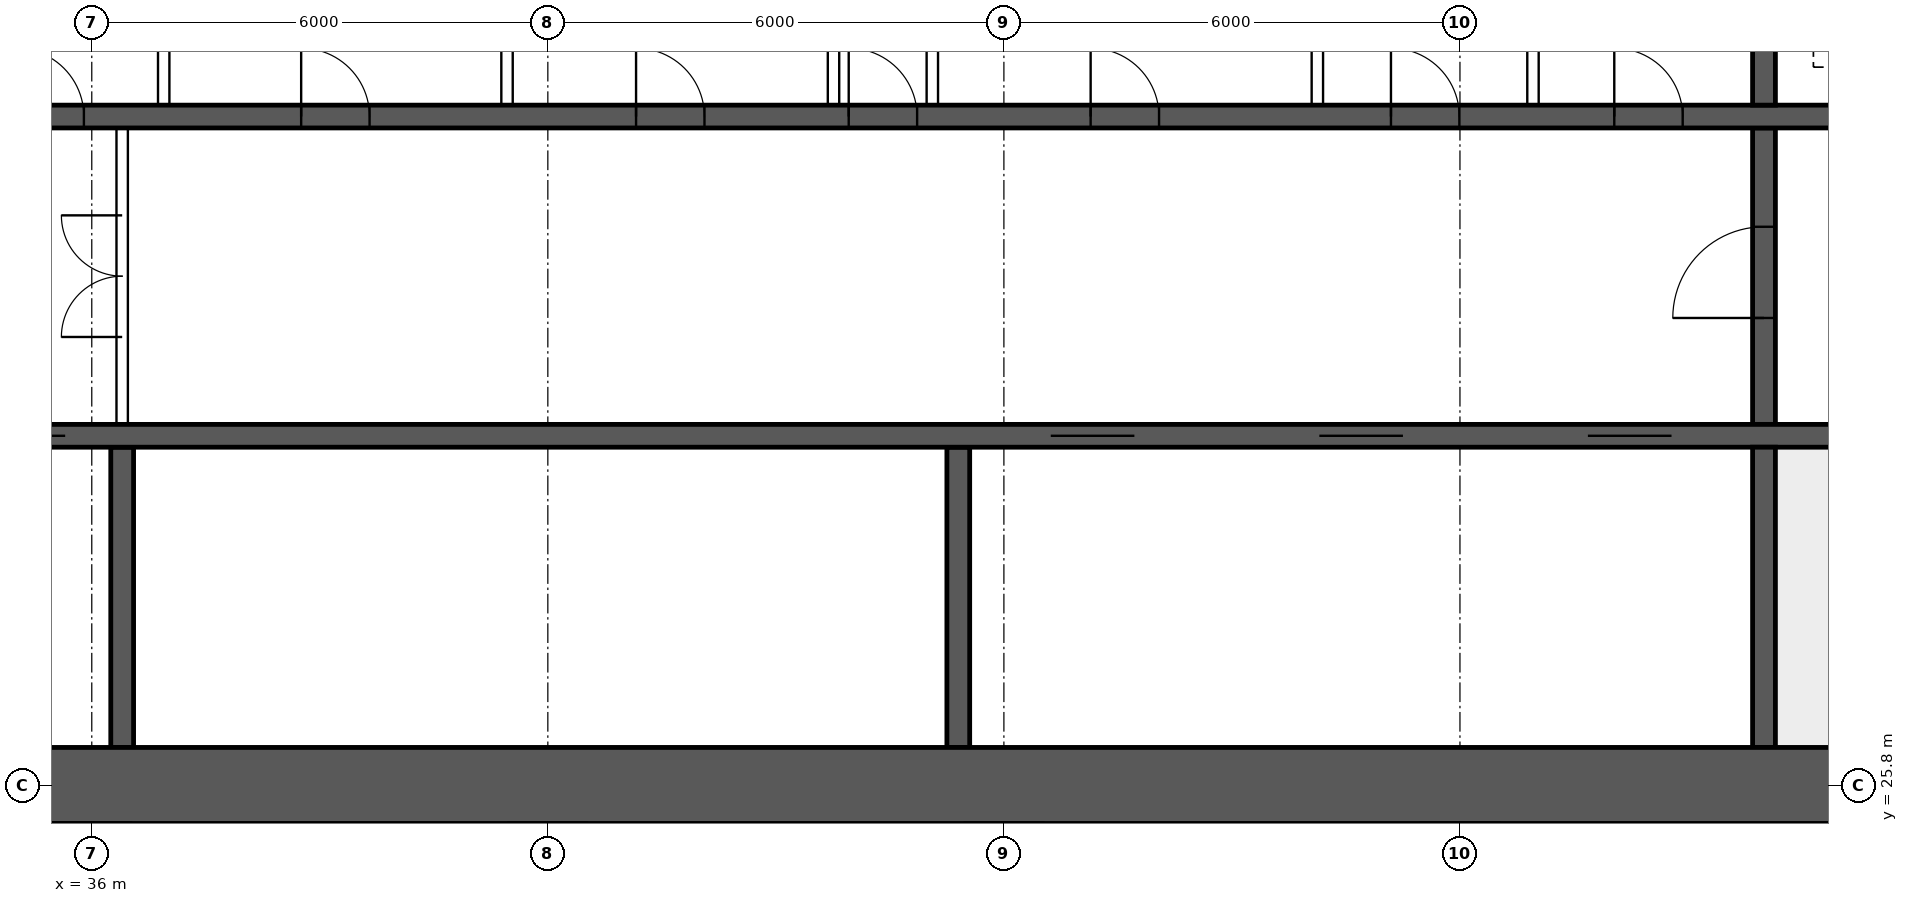
"""IFC4 building model, lengths in metres.
Left out: names, types, materials, properties, quantities, classifications, styles, units other than length and angle.
Written with IfcOpenShell. Run it as: python <this file> out.ifc"""

import sys

from ifc_helpers import new_model, si_unit, direction, frame, frame_2d, origin, place, context, subcontext, project, spatial, rectangle, extrude, element, fill, save


model = new_model("IFC4")
c1 = context("Model", 3, precision=1e-05, world=origin(), true_north=direction((0.0, 1.0)))
c2 = subcontext(c1, "Body", "Model", "MODEL_VIEW")
j1 = project(units=[si_unit("LENGTHUNIT", "METRE"), si_unit("PLANEANGLEUNIT", "RADIAN")], contexts=[c1])
p1 = place(None, origin())
s1 = spatial("IfcSite", under=j1, at=p1, CompositionType="ELEMENT")
p2 = place(p1, origin())
s2 = spatial("IfcBuilding", under=s1, at=p2, CompositionType="ELEMENT")
p3 = place(p2, frame((0.0, 0.0, 42.7)))
s3 = spatial("IfcBuildingStorey", under=s2, at=p3, CompositionType="ELEMENT", Elevation=42.7)
p4 = place(p3, frame((18.0, 25.8, 0.0), z_axis=(0.0, 0.0, 1.0), x_axis=(1.0, 0.0, 0.0)))
e1 = element("IfcWall", 1, at=p4, inside=s3, PredefinedType="SHEAR", context=c2, shape_type="SweptSolid", body=[
    extrude(rectangle(XDim=48.0, YDim=1.0, at=frame_2d((24.0, 0.0))), origin(), (0.0, 0.0, 1.0), 3.75),
])
p5 = place(p3, frame((18.5, 30.4, 0.0), z_axis=(0.0, 0.0, 1.0), x_axis=(1.0, 0.0, 0.0)))
e2 = element("IfcWall", 2, at=p5, inside=s3, PredefinedType="SHEAR", context=c2, shape_type="SweptSolid", body=[
    extrude(rectangle(XDim=47.0, YDim=0.3, at=frame_2d((23.5, 0.0))), origin(), (0.0, 0.0, 1.0), 3.75),
])
p6 = place(p5, frame((0.4, 0.0, 0.0)))
e3 = element("IfcOpeningElement", 3, at=p6, cuts=e2, PredefinedType="OPENING", context=c2, shape_type="SweptSolid", body=[
    extrude(rectangle(XDim=1.0, YDim=2.1, at=frame_2d((0.5, 1.05))), frame((0.0, 0.16, 0.0), z_axis=(0.0, -1.0, 0.0), x_axis=(1.0, 0.0, 0.0)), (0.0, 0.0, 1.0), 0.32),
])
p7 = place(p5, frame((45.6, 0.0, 0.0)))
e4 = element("IfcOpeningElement", 4, at=p7, cuts=e2, PredefinedType="OPENING", context=c2, shape_type="SweptSolid", body=[
    extrude(rectangle(XDim=1.0, YDim=2.1, at=frame_2d((0.5, 1.05))), frame((0.0, 0.16, 0.0), z_axis=(0.0, -1.0, 0.0), x_axis=(1.0, 0.0, 0.0)), (0.0, 0.0, 1.0), 0.32),
])
p8 = place(p5, frame((8.25, 0.0, 0.0)))
e5 = element("IfcOpeningElement", 5, at=p8, cuts=e2, PredefinedType="OPENING", context=c2, shape_type="SweptSolid", body=[
    extrude(rectangle(XDim=1.1, YDim=2.1, at=frame_2d((0.55, 1.05))), frame((0.0, 0.16, 0.0), z_axis=(0.0, -1.0, 0.0), x_axis=(1.0, 0.0, 0.0)), (0.0, 0.0, 1.0), 0.32),
])
p9 = place(p5, frame((10.85, 0.0, 0.0)))
e6 = element("IfcOpeningElement", 6, at=p9, cuts=e2, PredefinedType="OPENING", context=c2, shape_type="SweptSolid", body=[
    extrude(rectangle(XDim=1.1, YDim=2.1, at=frame_2d((0.55, 1.05))), frame((0.0, 0.16, 0.0), z_axis=(0.0, -1.0, 0.0), x_axis=(1.0, 0.0, 0.0)), (0.0, 0.0, 1.0), 0.32),
])
p10 = place(p5, frame((13.45, 0.0, 0.0)))
e7 = element("IfcOpeningElement", 7, at=p10, cuts=e2, PredefinedType="OPENING", context=c2, shape_type="SweptSolid", body=[
    extrude(rectangle(XDim=1.1, YDim=2.1, at=frame_2d((0.55, 1.05))), frame((0.0, 0.16, 0.0), z_axis=(0.0, -1.0, 0.0), x_axis=(1.0, 0.0, 0.0)), (0.0, 0.0, 1.0), 0.32),
])
p11 = place(p5, frame((16.05, 0.0, 0.0)))
e8 = element("IfcOpeningElement", 8, at=p11, cuts=e2, PredefinedType="OPENING", context=c2, shape_type="SweptSolid", body=[
    extrude(rectangle(XDim=1.1, YDim=2.1, at=frame_2d((0.55, 1.05))), frame((0.0, 0.16, 0.0), z_axis=(0.0, -1.0, 0.0), x_axis=(1.0, 0.0, 0.0)), (0.0, 0.0, 1.0), 0.32),
])
p12 = place(p5, frame((30.117, 0.0, 0.0)))
e9 = element("IfcOpeningElement", 9, at=p12, cuts=e2, PredefinedType="OPENING", context=c2, shape_type="SweptSolid", body=[
    extrude(rectangle(XDim=1.1, YDim=2.1, at=frame_2d((0.55, 1.05))), frame((0.0, 0.16, 0.0), z_axis=(0.0, -1.0, 0.0), x_axis=(1.0, 0.0, 0.0)), (0.0, 0.0, 1.0), 0.32),
])
p13 = place(p5, frame((33.65, 0.0, 0.0)))
e10 = element("IfcOpeningElement", 10, at=p13, cuts=e2, PredefinedType="OPENING", context=c2, shape_type="SweptSolid", body=[
    extrude(rectangle(XDim=1.1, YDim=2.1, at=frame_2d((0.55, 1.05))), frame((0.0, 0.16, 0.0), z_axis=(0.0, -1.0, 0.0), x_axis=(1.0, 0.0, 0.0)), (0.0, 0.0, 1.0), 0.32),
])
p14 = place(p5, frame((37.183, 0.0, 0.0)))
e11 = element("IfcOpeningElement", 11, at=p14, cuts=e2, PredefinedType="OPENING", context=c2, shape_type="SweptSolid", body=[
    extrude(rectangle(XDim=1.1, YDim=2.1, at=frame_2d((0.55, 1.05))), frame((0.0, 0.16, 0.0), z_axis=(0.0, -1.0, 0.0), x_axis=(1.0, 0.0, 0.0)), (0.0, 0.0, 1.0), 0.32),
])
p15 = place(p3, frame((18.5, 34.6, 0.0), z_axis=(0.0, 0.0, 1.0), x_axis=(1.0, 0.0, 0.0)))
e12 = element("IfcWall", 12, at=p15, inside=s3, PredefinedType="SHEAR", context=c2, shape_type="SweptSolid", body=[
    extrude(rectangle(XDim=47.0, YDim=0.3, at=frame_2d((23.5, 0.0))), origin(), (0.0, 0.0, 1.0), 3.75),
])
p16 = place(p15, frame((0.9, 0.0, 0.0)))
e13 = element("IfcOpeningElement", 13, at=p16, cuts=e12, PredefinedType="OPENING", context=c2, shape_type="SweptSolid", body=[
    extrude(rectangle(XDim=1.1, YDim=2.1, at=frame_2d((0.55, 1.05))), frame((0.0, 0.16, 0.0), z_axis=(0.0, -1.0, 0.0), x_axis=(1.0, 0.0, 0.0)), (0.0, 0.0, 1.0), 0.32),
])
p17 = place(p15, frame((45.0, 0.0, 0.0)))
e14 = element("IfcOpeningElement", 14, at=p17, cuts=e12, PredefinedType="OPENING", context=c2, shape_type="SweptSolid", body=[
    extrude(rectangle(XDim=1.1, YDim=2.1, at=frame_2d((0.55, 1.05))), frame((0.0, 0.16, 0.0), z_axis=(0.0, -1.0, 0.0), x_axis=(1.0, 0.0, 0.0)), (0.0, 0.0, 1.0), 0.32),
])
p18 = place(p15, frame((4.1, 0.0, 0.0)))
e15 = element("IfcOpeningElement", 15, at=p18, cuts=e12, PredefinedType="OPENING", context=c2, shape_type="SweptSolid", body=[
    extrude(rectangle(XDim=0.9, YDim=2.1, at=frame_2d((0.45, 1.05))), frame((0.0, 0.16, 0.0), z_axis=(0.0, -1.0, 0.0), x_axis=(1.0, 0.0, 0.0)), (0.0, 0.0, 1.0), 0.32),
])
p19 = place(p15, frame((42.0, 0.0, 0.0)))
e16 = element("IfcOpeningElement", 16, at=p19, cuts=e12, PredefinedType="OPENING", context=c2, shape_type="SweptSolid", body=[
    extrude(rectangle(XDim=0.9, YDim=2.1, at=frame_2d((0.45, 1.05))), frame((0.0, 0.16, 0.0), z_axis=(0.0, -1.0, 0.0), x_axis=(1.0, 0.0, 0.0)), (0.0, 0.0, 1.0), 0.32),
])
p20 = place(p15, frame((8.875, 0.0, 0.0)))
e17 = element("IfcOpeningElement", 17, at=p20, cuts=e12, PredefinedType="OPENING", context=c2, shape_type="SweptSolid", body=[
    extrude(rectangle(XDim=0.9, YDim=2.1, at=frame_2d((0.45, 1.05))), frame((0.0, 0.16, 0.0), z_axis=(0.0, -1.0, 0.0), x_axis=(1.0, 0.0, 0.0)), (0.0, 0.0, 1.0), 0.32),
])
p21 = place(p15, frame((12.849, 0.0, 0.0)))
e18 = element("IfcOpeningElement", 18, at=p21, cuts=e12, PredefinedType="OPENING", context=c2, shape_type="SweptSolid", body=[
    extrude(rectangle(XDim=0.9, YDim=2.1, at=frame_2d((0.45, 1.05))), frame((0.0, 0.16, 0.0), z_axis=(0.0, -1.0, 0.0), x_axis=(1.0, 0.0, 0.0)), (0.0, 0.0, 1.0), 0.32),
])
p22 = place(p15, frame((16.496, 0.0, 0.0)))
e19 = element("IfcOpeningElement", 19, at=p22, cuts=e12, PredefinedType="OPENING", context=c2, shape_type="SweptSolid", body=[
    extrude(rectangle(XDim=0.9, YDim=2.1, at=frame_2d((0.45, 1.05))), frame((0.0, 0.16, 0.0), z_axis=(0.0, -1.0, 0.0), x_axis=(1.0, 0.0, 0.0)), (0.0, 0.0, 1.0), 0.32),
])
p23 = place(p15, frame((20.255, 0.0, 0.0)))
e20 = element("IfcOpeningElement", 20, at=p23, cuts=e12, PredefinedType="OPENING", context=c2, shape_type="SweptSolid", body=[
    extrude(rectangle(XDim=0.9, YDim=2.1, at=frame_2d((0.45, 1.05))), frame((0.0, 0.16, 0.0), z_axis=(0.0, -1.0, 0.0), x_axis=(1.0, 0.0, 0.0)), (0.0, 0.0, 1.0), 0.32),
])
p24 = place(p15, frame((24.661, 0.0, 0.0)))
e21 = element("IfcOpeningElement", 21, at=p24, cuts=e12, PredefinedType="OPENING", context=c2, shape_type="SweptSolid", body=[
    extrude(rectangle(XDim=0.9, YDim=2.1, at=frame_2d((0.45, 1.05))), frame((0.0, 0.16, 0.0), z_axis=(0.0, -1.0, 0.0), x_axis=(1.0, 0.0, 0.0)), (0.0, 0.0, 1.0), 0.32),
])
p25 = place(p15, frame((27.458, 0.0, 0.0)))
e22 = element("IfcOpeningElement", 22, at=p25, cuts=e12, PredefinedType="OPENING", context=c2, shape_type="SweptSolid", body=[
    extrude(rectangle(XDim=0.9, YDim=2.1, at=frame_2d((0.45, 1.05))), frame((0.0, 0.16, 0.0), z_axis=(0.0, -1.0, 0.0), x_axis=(1.0, 0.0, 0.0)), (0.0, 0.0, 1.0), 0.32),
])
p26 = place(p15, frame((30.641, 0.0, 0.0)))
e23 = element("IfcOpeningElement", 23, at=p26, cuts=e12, PredefinedType="OPENING", context=c2, shape_type="SweptSolid", body=[
    extrude(rectangle(XDim=0.9, YDim=2.1, at=frame_2d((0.45, 1.05))), frame((0.0, 0.16, 0.0), z_axis=(0.0, -1.0, 0.0), x_axis=(1.0, 0.0, 0.0)), (0.0, 0.0, 1.0), 0.32),
])
p27 = place(p15, frame((34.592, 0.0, 0.0)))
e24 = element("IfcOpeningElement", 24, at=p27, cuts=e12, PredefinedType="OPENING", context=c2, shape_type="SweptSolid", body=[
    extrude(rectangle(XDim=0.9, YDim=2.1, at=frame_2d((0.45, 1.05))), frame((0.0, 0.16, 0.0), z_axis=(0.0, -1.0, 0.0), x_axis=(1.0, 0.0, 0.0)), (0.0, 0.0, 1.0), 0.32),
])
p28 = place(p15, frame((37.53, 0.0, 0.0)))
e25 = element("IfcOpeningElement", 25, at=p28, cuts=e12, PredefinedType="OPENING", context=c2, shape_type="SweptSolid", body=[
    extrude(rectangle(XDim=0.9, YDim=2.1, at=frame_2d((0.45, 1.05))), frame((0.0, 0.16, 0.0), z_axis=(0.0, -1.0, 0.0), x_axis=(1.0, 0.0, 0.0)), (0.0, 0.0, 1.0), 0.32),
])
p29 = place(p3, frame((58.0, 26.3, 0.0), z_axis=(0.0, 0.0, 1.0), x_axis=(0.0, 1.0, 0.0)))
e26 = element("IfcWall", 26, at=p29, inside=s3, PredefinedType="SHEAR", context=c2, shape_type="SweptSolid", body=[
    extrude(rectangle(XDim=3.95, YDim=0.3, at=frame_2d((1.975, 0.0))), origin(), (0.0, 0.0, 1.0), 3.75),
])
p30 = place(p3, frame((58.0, 30.55, 0.0), z_axis=(0.0, 0.0, 1.0), x_axis=(0.0, 1.0, 0.0)))
e27 = element("IfcWall", 27, at=p30, inside=s3, PredefinedType="SHEAR", context=c2, shape_type="SweptSolid", body=[
    extrude(rectangle(XDim=3.9, YDim=0.3, at=frame_2d((1.95, 0.0))), origin(), (0.0, 0.0, 1.0), 3.75),
])
p31 = place(p30, frame((1.4, 0.0, 0.0)))
e28 = element("IfcOpeningElement", 28, at=p31, cuts=e27, PredefinedType="OPENING", context=c2, shape_type="SweptSolid", body=[
    extrude(rectangle(XDim=1.2, YDim=2.1, at=frame_2d((0.6, 1.05))), frame((0.0, 0.16, 0.0), z_axis=(0.0, -1.0, 0.0), x_axis=(1.0, 0.0, 0.0)), (0.0, 0.0, 1.0), 0.32),
])
p32 = place(p3, frame((58.0, 34.75, 0.0), z_axis=(0.0, 0.0, 1.0), x_axis=(0.0, 1.0, 0.0)))
e29 = element("IfcWall", 29, at=p32, inside=s3, PredefinedType="SHEAR", context=c2, shape_type="SweptSolid", body=[
    extrude(rectangle(XDim=2.95, YDim=0.3, at=frame_2d((1.475, 0.0))), origin(), (0.0, 0.0, 1.0), 3.75),
])
for number, where, z_axis, x_axis in (
    (30, (36.4, 26.3, 0.0), (0.0, 0.0, 1.0), (0.0, 1.0, 0.0)),
    (31, (47.4, 26.3, 0.0), (0.0, 0.0, 1.0), (0.0, 1.0, 0.0)),
):
    element("IfcWall", number, at=place(p3, frame(where, z_axis=z_axis, x_axis=x_axis)), inside=s3, PredefinedType="SHEAR", context=c2, shape_type="SweptSolid", body=[
        extrude(rectangle(XDim=3.95, YDim=0.3, at=frame_2d((1.975, 0.0))), origin(), (0.0, 0.0, 1.0), 3.75),
    ])
p33 = place(p3, frame((36.4, 30.55, 0.0), z_axis=(0.0, 0.0, 1.0), x_axis=(0.0, 1.0, 0.0)))
e32 = element("IfcWall", 32, at=p33, inside=s3, PredefinedType="SOLIDWALL", context=c2, shape_type="SweptSolid", body=[
    extrude(rectangle(XDim=3.9, YDim=0.15, at=frame_2d((1.95, 0.0))), origin(), (0.0, 0.0, 1.0), 3.5),
])
p34 = place(p33, frame((1.15, 0.0, 0.0)))
e33 = element("IfcOpeningElement", 33, at=p34, cuts=e32, PredefinedType="OPENING", context=c2, shape_type="SweptSolid", body=[
    extrude(rectangle(XDim=1.6, YDim=2.1, at=frame_2d((0.8, 1.05))), frame((0.0, 0.085, 0.0), z_axis=(0.0, -1.0, 0.0), x_axis=(1.0, 0.0, 0.0)), (0.0, 0.0, 1.0), 0.17),
])
for number, where, z_axis, x_axis in (
    (34, (36.946, 34.75, 0.0), (0.0, 0.0, 1.0), (0.0, 1.0, 0.0)),
    (35, (41.463, 34.75, 0.0), (0.0, 0.0, 1.0), (0.0, 1.0, 0.0)),
    (36, (45.758, 34.75, 0.0), (0.0, 0.0, 1.0), (0.0, 1.0, 0.0)),
    (37, (47.058, 34.75, 0.0), (0.0, 0.0, 1.0), (0.0, 1.0, 0.0)),
    (38, (52.124, 34.75, 0.0), (0.0, 0.0, 1.0), (0.0, 1.0, 0.0)),
    (39, (54.961, 34.75, 0.0), (0.0, 0.0, 1.0), (0.0, 1.0, 0.0)),
):
    element("IfcWall", number, at=place(p3, frame(where, z_axis=z_axis, x_axis=x_axis)), inside=s3, PredefinedType="SOLIDWALL", context=c2, shape_type="SweptSolid", body=[
        extrude(rectangle(XDim=2.95, YDim=0.15, at=frame_2d((1.475, 0.0))), origin(), (0.0, 0.0, 1.0), 3.5),
    ])
for number, where, z_axis, x_axis in (
    (40, (39.31, 14.9, 0.0), (0.0, 0.0, 1.0), (0.0, 1.0, 0.0)),
    (41, (45.48, 14.9, 0.0), (0.0, 0.0, 1.0), (0.0, 1.0, 0.0)),
):
    element("IfcWall", number, at=place(p3, frame(where, z_axis=z_axis, x_axis=x_axis)), inside=s3, PredefinedType="PARTITIONING", context=c2, shape_type="SweptSolid", body=[
        extrude(rectangle(XDim=10.4, YDim=0.15, at=frame_2d((5.2, 0.0))), origin(), (0.0, 0.0, 1.0), 3.5),
    ])
p35 = place(p34, origin())
e42 = element("IfcDoor", 42, at=p35, inside=s3, OperationType="DOUBLE_DOOR_SINGLE_SWING", PredefinedType="DOOR", context=c2, shape_type="SweptSolid", body=[
    extrude(rectangle(XDim=1.6, YDim=2.1, at=frame_2d((0.8, 1.05))), frame((0.0, 0.025, 0.0), z_axis=(0.0, -1.0, 0.0), x_axis=(1.0, 0.0, 0.0)), (0.0, 0.0, 1.0), 0.05),
])
fill(e33, e42)
p36 = place(p31, origin())
e43 = element("IfcDoor", 43, at=p36, inside=s3, OperationType="SINGLE_SWING_LEFT", PredefinedType="DOOR", context=c2, shape_type="SweptSolid", body=[
    extrude(rectangle(XDim=1.2, YDim=2.1, at=frame_2d((0.6, 1.05))), frame((0.0, 0.025, 0.0), z_axis=(0.0, -1.0, 0.0), x_axis=(1.0, 0.0, 0.0)), (0.0, 0.0, 1.0), 0.05),
])
fill(e28, e43)
p37 = place(p22, origin())
e44 = element("IfcDoor", 44, at=p37, inside=s3, OperationType="SINGLE_SWING_LEFT", PredefinedType="DOOR", context=c2, shape_type="SweptSolid", body=[
    extrude(rectangle(XDim=0.9, YDim=2.1, at=frame_2d((0.45, 1.05))), frame((0.0, 0.025, 0.0), z_axis=(0.0, -1.0, 0.0), x_axis=(1.0, 0.0, 0.0)), (0.0, 0.0, 1.0), 0.05),
])
fill(e19, e44)
p38 = place(p23, origin())
e45 = element("IfcDoor", 45, at=p38, inside=s3, OperationType="SINGLE_SWING_LEFT", PredefinedType="DOOR", context=c2, shape_type="SweptSolid", body=[
    extrude(rectangle(XDim=0.9, YDim=2.1, at=frame_2d((0.45, 1.05))), frame((0.0, 0.025, 0.0), z_axis=(0.0, -1.0, 0.0), x_axis=(1.0, 0.0, 0.0)), (0.0, 0.0, 1.0), 0.05),
])
fill(e20, e45)
p39 = place(p24, origin())
e46 = element("IfcDoor", 46, at=p39, inside=s3, OperationType="SINGLE_SWING_LEFT", PredefinedType="DOOR", context=c2, shape_type="SweptSolid", body=[
    extrude(rectangle(XDim=0.9, YDim=2.1, at=frame_2d((0.45, 1.05))), frame((0.0, 0.025, 0.0), z_axis=(0.0, -1.0, 0.0), x_axis=(1.0, 0.0, 0.0)), (0.0, 0.0, 1.0), 0.05),
])
fill(e21, e46)
p40 = place(p25, origin())
e47 = element("IfcDoor", 47, at=p40, inside=s3, OperationType="SINGLE_SWING_LEFT", PredefinedType="DOOR", context=c2, shape_type="SweptSolid", body=[
    extrude(rectangle(XDim=0.9, YDim=2.1, at=frame_2d((0.45, 1.05))), frame((0.0, 0.025, 0.0), z_axis=(0.0, -1.0, 0.0), x_axis=(1.0, 0.0, 0.0)), (0.0, 0.0, 1.0), 0.05),
])
fill(e22, e47)
p41 = place(p26, origin())
e48 = element("IfcDoor", 48, at=p41, inside=s3, OperationType="SINGLE_SWING_LEFT", PredefinedType="DOOR", context=c2, shape_type="SweptSolid", body=[
    extrude(rectangle(XDim=0.9, YDim=2.1, at=frame_2d((0.45, 1.05))), frame((0.0, 0.025, 0.0), z_axis=(0.0, -1.0, 0.0), x_axis=(1.0, 0.0, 0.0)), (0.0, 0.0, 1.0), 0.05),
])
fill(e23, e48)
p42 = place(p27, origin())
e49 = element("IfcDoor", 49, at=p42, inside=s3, OperationType="SINGLE_SWING_LEFT", PredefinedType="DOOR", context=c2, shape_type="SweptSolid", body=[
    extrude(rectangle(XDim=0.9, YDim=2.1, at=frame_2d((0.45, 1.05))), frame((0.0, 0.025, 0.0), z_axis=(0.0, -1.0, 0.0), x_axis=(1.0, 0.0, 0.0)), (0.0, 0.0, 1.0), 0.05),
])
fill(e24, e49)
p43 = place(p28, origin())
e50 = element("IfcDoor", 50, at=p43, inside=s3, OperationType="SINGLE_SWING_LEFT", PredefinedType="DOOR", context=c2, shape_type="SweptSolid", body=[
    extrude(rectangle(XDim=0.9, YDim=2.1, at=frame_2d((0.45, 1.05))), frame((0.0, 0.025, 0.0), z_axis=(0.0, -1.0, 0.0), x_axis=(1.0, 0.0, 0.0)), (0.0, 0.0, 1.0), 0.05),
])
fill(e25, e50)
p44 = place(p11, origin())
e51 = element("IfcDoor", 51, at=p44, inside=s3, OperationType="DOUBLE_DOOR_SLIDING", PredefinedType="DOOR", context=c2, shape_type="SweptSolid", body=[
    extrude(rectangle(XDim=1.1, YDim=2.1, at=frame_2d((0.55, 1.05))), frame((0.0, 0.025, 0.0), z_axis=(0.0, -1.0, 0.0), x_axis=(1.0, 0.0, 0.0)), (0.0, 0.0, 1.0), 0.05),
])
fill(e8, e51)
p45 = place(p12, origin())
e52 = element("IfcDoor", 52, at=p45, inside=s3, OperationType="DOUBLE_DOOR_SLIDING", PredefinedType="DOOR", context=c2, shape_type="SweptSolid", body=[
    extrude(rectangle(XDim=1.1, YDim=2.1, at=frame_2d((0.55, 1.05))), frame((0.0, 0.025, 0.0), z_axis=(0.0, -1.0, 0.0), x_axis=(1.0, 0.0, 0.0)), (0.0, 0.0, 1.0), 0.05),
])
fill(e9, e52)
p46 = place(p13, origin())
e53 = element("IfcDoor", 53, at=p46, inside=s3, OperationType="DOUBLE_DOOR_SLIDING", PredefinedType="DOOR", context=c2, shape_type="SweptSolid", body=[
    extrude(rectangle(XDim=1.1, YDim=2.1, at=frame_2d((0.55, 1.05))), frame((0.0, 0.025, 0.0), z_axis=(0.0, -1.0, 0.0), x_axis=(1.0, 0.0, 0.0)), (0.0, 0.0, 1.0), 0.05),
])
fill(e10, e53)
p47 = place(p14, origin())
e54 = element("IfcDoor", 54, at=p47, inside=s3, OperationType="DOUBLE_DOOR_SLIDING", PredefinedType="DOOR", context=c2, shape_type="SweptSolid", body=[
    extrude(rectangle(XDim=1.1, YDim=2.1, at=frame_2d((0.55, 1.05))), frame((0.0, 0.025, 0.0), z_axis=(0.0, -1.0, 0.0), x_axis=(1.0, 0.0, 0.0)), (0.0, 0.0, 1.0), 0.05),
])
fill(e11, e54)
save(model, sys.argv[1])
